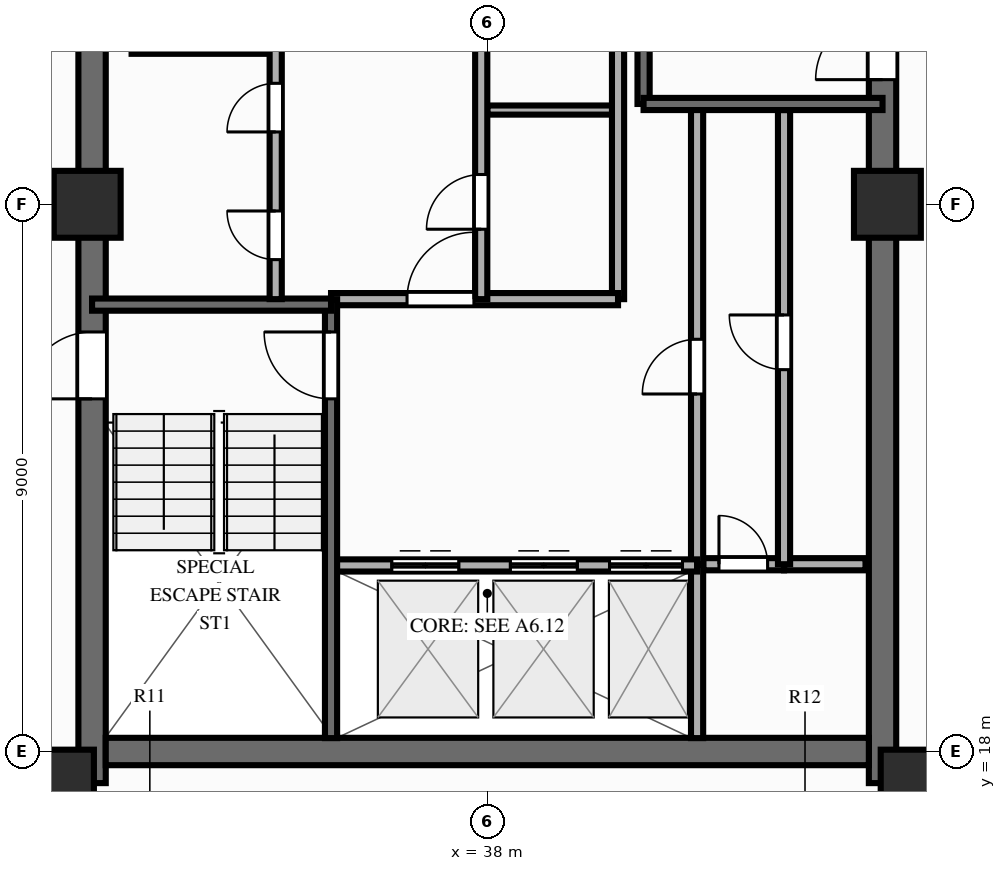
"""IFC4 building model, lengths in metres.
Left out: names, types, materials, properties, quantities, classifications, styles, units other than length and angle.
Written with IfcOpenShell. Run it as: python <this file> out.ifc"""

import sys

from ifc_helpers import new_model, si_unit, direction, frame, frame_2d, origin, origin_2d, place, context, subcontext, project, spatial, rectangle, extrude, source, transform, mapped, element, fill, save


model = new_model("IFC4")
c1 = context("Model", 3, precision=1e-05, world=origin(), true_north=direction((0.0, 1.0)))
c2 = subcontext(c1, "Body", "Model", "MODEL_VIEW")
j1 = project(units=[si_unit("LENGTHUNIT", "METRE"), si_unit("PLANEANGLEUNIT", "RADIAN")], contexts=[c1])
p1 = place(None, origin())
s1 = spatial("IfcSite", under=j1, at=p1, CompositionType="ELEMENT")
p2 = place(p1, origin())
s2 = spatial("IfcBuilding", under=s1, at=p2, CompositionType="ELEMENT")
p3 = place(p2, frame((0.0, 0.0, 176.8)))
s3 = spatial("IfcBuildingStorey", under=s2, at=p3, CompositionType="ELEMENT", Elevation=176.8)
p4 = place(p3, frame((31.5, 17.48, 0.0), z_axis=(0.0, 0.0, 1.0), x_axis=(0.0, 1.0, 0.0)))
e1 = element("IfcWall", 1, at=p4, inside=s3, PredefinedType="SHEAR", context=c2, shape_type="SweptSolid", body=[
    extrude(rectangle(XDim=19.04, YDim=0.45, at=frame_2d((9.52, 0.0))), origin(), (0.0, 0.0, 1.0), 3.0),
])
p5 = place(p4, frame((6.32, 0.0, 0.0)))
e2 = element("IfcOpeningElement", 2, at=p5, cuts=e1, PredefinedType="OPENING", context=c2, shape_type="SweptSolid", body=[
    extrude(rectangle(XDim=1.1, YDim=2.15, at=frame_2d((0.55, 1.075))), frame((0.0, 0.237, 0.0), z_axis=(0.0, -1.0, 0.0), x_axis=(1.0, 0.0, 0.0)), (0.0, 0.0, 1.0), 0.474),
])
p6 = place(p3, frame((44.5, 17.48, 0.0), z_axis=(0.0, 0.0, 1.0), x_axis=(0.0, 1.0, 0.0)))
e3 = element("IfcWall", 3, at=p6, inside=s3, PredefinedType="SHEAR", context=c2, shape_type="SweptSolid", body=[
    extrude(rectangle(XDim=19.04, YDim=0.45, at=frame_2d((9.52, 0.0))), origin(), (0.0, 0.0, 1.0), 3.0),
])
p7 = place(p6, frame((12.67, 0.0, 0.0), z_axis=(0.0, 0.0, 1.0), x_axis=(-1.0, 0.0, 0.0)))
e4 = element("IfcOpeningElement", 4, at=p7, cuts=e3, PredefinedType="OPENING", context=c2, shape_type="SweptSolid", body=[
    extrude(rectangle(XDim=1.1, YDim=2.15, at=frame_2d((0.55, 1.075))), frame((0.0, 0.237, 0.0), z_axis=(0.0, -1.0, 0.0), x_axis=(1.0, 0.0, 0.0)), (0.0, 0.0, 1.0), 0.474),
])
p8 = place(p3, frame((31.725, 18.0, 0.0), z_axis=(0.0, 0.0, 1.0), x_axis=(1.0, 0.0, 0.0)))
e5 = element("IfcWall", 5, at=p8, inside=s3, PredefinedType="SHEAR", context=c2, shape_type="SweptSolid", body=[
    extrude(rectangle(XDim=12.55, YDim=0.45, at=frame_2d((6.275, 0.0))), origin(), (0.0, 0.0, 1.0), 3.0),
])
m1 = source(origin(), c2, "Body", "SweptSolid", [
    extrude(rectangle(XDim=1.1, YDim=1.1, at=origin_2d()), origin(), (0.0, 0.0, 1.0), 3.0),
])
for number, where, z_axis, x_axis in (
    (6, (30.98, 17.48, 0.0), (0.0, 0.0, 1.0), (1.0, 0.0, 0.0)),
    (7, (45.02, 17.48, 0.0), (0.0, 0.0, 1.0), (1.0, 0.0, 0.0)),
    (8, (31.42, 27.0, 0.0), (0.0, 0.0, 1.0), (1.0, 0.0, 0.0)),
    (9, (44.58, 27.0, 0.0), (0.0, 0.0, 1.0), (1.0, 0.0, 0.0)),
):
    element("IfcColumn", number, at=place(p3, frame(where, z_axis=z_axis, x_axis=x_axis)), inside=s3, PredefinedType="COLUMN", context=c2, shape_type="MappedRepresentation", body=[
        mapped(m1, transform((0.0, 0.0, 0.0), scale=1.0)),
    ])
p9 = place(p3, frame((32.15, 29.55, 0.0), z_axis=(0.0, 0.0, 1.0), x_axis=(1.0, 0.0, 0.0)))
e10 = element("IfcWall", 10, at=p9, inside=s3, PredefinedType="PARTITIONING", context=c2, shape_type="SweptSolid", body=[
    extrude(rectangle(XDim=2.27, YDim=0.15, at=frame_2d((1.135, 0.0))), origin(), (0.0, 0.0, 1.0), 2.79),
])
p10 = place(p3, frame((38.0, 28.55, 0.0), z_axis=(0.0, 0.0, 1.0), x_axis=(1.0, 0.0, 0.0)))
e11 = element("IfcWall", 11, at=p10, inside=s3, PredefinedType="PARTITIONING", context=c2, shape_type="SweptSolid", body=[
    extrude(rectangle(XDim=2.2, YDim=0.15, at=frame_2d((1.1, 0.0))), origin(), (0.0, 0.0, 1.0), 2.14),
])
p11 = place(p3, frame((41.55, 21.08, 0.0), z_axis=(0.0, 0.0, 1.0), x_axis=(1.0, 0.0, 0.0)))
e12 = element("IfcWall", 12, at=p11, inside=s3, PredefinedType="PARTITIONING", context=c2, shape_type="SweptSolid", body=[
    extrude(rectangle(XDim=1.33, YDim=0.2, at=frame_2d((0.665, 0.0))), origin(), (0.0, 0.0, 1.0), 2.79),
])
p12 = place(p11, frame((0.26, 0.0, 0.0)))
e13 = element("IfcOpeningElement", 13, at=p12, cuts=e12, PredefinedType="OPENING", context=c2, shape_type="SweptSolid", body=[
    extrude(rectangle(XDim=0.8, YDim=2.05, at=frame_2d((0.4, 1.025))), frame((0.0, 0.112, 0.0), z_axis=(0.0, -1.0, 0.0), x_axis=(1.0, 0.0, 0.0)), (0.0, 0.0, 1.0), 0.224),
])
p13 = place(p3, frame((42.88, 21.08, 0.0), z_axis=(0.0, 0.0, 1.0), x_axis=(1.0, 0.0, 0.0)))
e14 = element("IfcWall", 14, at=p13, inside=s3, PredefinedType="PARTITIONING", context=c2, shape_type="SweptSolid", body=[
    extrude(rectangle(XDim=1.34, YDim=0.2, at=frame_2d((0.67, 0.0))), origin(), (0.0, 0.0, 1.0), 2.79),
])
p14 = place(p3, frame((42.88, 21.08, 0.0), z_axis=(0.0, 0.0, 1.0), x_axis=(0.0, 1.0, 0.0)))
e15 = element("IfcWall", 15, at=p14, inside=s3, PredefinedType="PARTITIONING", context=c2, shape_type="SweptSolid", body=[
    extrude(rectangle(XDim=7.47, YDim=0.2, at=frame_2d((3.735, 0.0))), origin(), (0.0, 0.0, 1.0), 2.79),
])
p15 = place(p14, frame((3.2, 0.0, 0.0)))
e16 = element("IfcOpeningElement", 16, at=p15, cuts=e15, PredefinedType="OPENING", context=c2, shape_type="SweptSolid", body=[
    extrude(rectangle(XDim=0.9, YDim=2.1, at=frame_2d((0.45, 1.05))), frame((0.0, 0.112, 0.0), z_axis=(0.0, -1.0, 0.0), x_axis=(1.0, 0.0, 0.0)), (0.0, 0.0, 1.0), 0.224),
])
p16 = place(p3, frame((41.45, 18.22, 0.0), z_axis=(0.0, 0.0, 1.0), x_axis=(0.0, 1.0, 0.0)))
e17 = element("IfcWall", 17, at=p16, inside=s3, PredefinedType="PARTITIONING", context=c2, shape_type="SweptSolid", body=[
    extrude(rectangle(XDim=2.86, YDim=0.2, at=frame_2d((1.43, 0.0))), origin(), (0.0, 0.0, 1.0), 2.79),
])
p17 = place(p3, frame((41.45, 21.08, 0.0), z_axis=(0.0, 0.0, 1.0), x_axis=(0.0, 1.0, 0.0)))
e18 = element("IfcWall", 18, at=p17, inside=s3, PredefinedType="PARTITIONING", context=c2, shape_type="SweptSolid", body=[
    extrude(rectangle(XDim=7.52, YDim=0.2, at=frame_2d((3.76, 0.0))), origin(), (0.0, 0.0, 1.0), 2.79),
])
p18 = place(p17, frame((2.8, 0.0, 0.0)))
e19 = element("IfcOpeningElement", 19, at=p18, cuts=e18, PredefinedType="OPENING", context=c2, shape_type="SweptSolid", body=[
    extrude(rectangle(XDim=0.9, YDim=2.1, at=frame_2d((0.45, 1.05))), frame((0.0, 0.112, 0.0), z_axis=(0.0, -1.0, 0.0), x_axis=(1.0, 0.0, 0.0)), (0.0, 0.0, 1.0), 0.224),
])
p19 = place(p3, frame((40.15, 25.44, 0.0), z_axis=(0.0, 0.0, 1.0), x_axis=(0.0, 1.0, 0.0)))
e20 = element("IfcWall", 20, at=p19, inside=s3, PredefinedType="PARTITIONING", context=c2, shape_type="SweptSolid", body=[
    extrude(rectangle(XDim=6.36, YDim=0.2, at=frame_2d((3.18, 0.0))), origin(), (0.0, 0.0, 1.0), 2.79),
])
p20 = place(p3, frame((35.43, 21.06, 0.0), z_axis=(0.0, 0.0, 1.0), x_axis=(1.0, 0.0, 0.0)))
e21 = element("IfcWall", 21, at=p20, inside=s3, PredefinedType="PARTITIONING", context=c2, shape_type="SweptSolid", body=[
    extrude(rectangle(XDim=6.02, YDim=0.2, at=frame_2d((3.01, 0.0))), origin(), (0.0, 0.0, 1.0), 2.79),
])
p21 = place(p20, frame((1.0, 0.0, 0.0)))
e22 = element("IfcOpeningElement", 22, at=p21, cuts=e21, PredefinedType="OPENING", context=c2, shape_type="SweptSolid", body=[
    extrude(rectangle(XDim=1.1, YDim=2.15, at=frame_2d((0.55, 1.075))), frame((0.0, 0.112, 0.0), z_axis=(0.0, -1.0, 0.0), x_axis=(1.0, 0.0, 0.0)), (0.0, 0.0, 1.0), 0.224),
])
p22 = place(p20, frame((2.95, 0.0, 0.0)))
e23 = element("IfcOpeningElement", 23, at=p22, cuts=e21, PredefinedType="OPENING", context=c2, shape_type="SweptSolid", body=[
    extrude(rectangle(XDim=1.1, YDim=2.15, at=frame_2d((0.55, 1.075))), frame((0.0, 0.112, 0.0), z_axis=(0.0, -1.0, 0.0), x_axis=(1.0, 0.0, 0.0)), (0.0, 0.0, 1.0), 0.224),
])
p23 = place(p20, frame((4.58, 0.0, 0.0)))
e24 = element("IfcOpeningElement", 24, at=p23, cuts=e21, PredefinedType="OPENING", context=c2, shape_type="SweptSolid", body=[
    extrude(rectangle(XDim=1.2, YDim=2.15, at=frame_2d((0.6, 1.075))), frame((0.0, 0.112, 0.0), z_axis=(0.0, -1.0, 0.0), x_axis=(1.0, 0.0, 0.0)), (0.0, 0.0, 1.0), 0.224),
])
p24 = place(p3, frame((35.43, 25.44, 0.0), z_axis=(0.0, 0.0, 1.0), x_axis=(1.0, 0.0, 0.0)))
e25 = element("IfcWall", 25, at=p24, inside=s3, PredefinedType="PARTITIONING", context=c2, shape_type="SweptSolid", body=[
    extrude(rectangle(XDim=4.72, YDim=0.2, at=frame_2d((2.36, 0.0))), origin(), (0.0, 0.0, 1.0), 2.79),
])
p25 = place(p24, frame((1.25, 0.0, 0.0)))
e26 = element("IfcOpeningElement", 26, at=p25, cuts=e25, PredefinedType="OPENING", context=c2, shape_type="SweptSolid", body=[
    extrude(rectangle(XDim=1.1, YDim=2.15, at=frame_2d((0.55, 1.075))), frame((0.0, 0.112, 0.0), z_axis=(0.0, -1.0, 0.0), x_axis=(1.0, 0.0, 0.0)), (0.0, 0.0, 1.0), 0.224),
])
p26 = place(p3, frame((35.43, 18.22, 0.0), z_axis=(0.0, 0.0, 1.0), x_axis=(0.0, 1.0, 0.0)))
e27 = element("IfcWall", 27, at=p26, inside=s3, PredefinedType="SOLIDWALL", context=c2, shape_type="SweptSolid", body=[
    extrude(rectangle(XDim=7.22, YDim=0.2, at=frame_2d((3.61, 0.0))), origin(), (0.0, 0.0, 1.0), 2.79),
])
p27 = place(p26, frame((6.68, 0.0, 0.0), z_axis=(0.0, 0.0, 1.0), x_axis=(-1.0, 0.0, 0.0)))
e28 = element("IfcOpeningElement", 28, at=p27, cuts=e27, PredefinedType="OPENING", context=c2, shape_type="SweptSolid", body=[
    extrude(rectangle(XDim=1.1, YDim=2.15, at=frame_2d((0.55, 1.075))), frame((0.0, 0.112, 0.0), z_axis=(0.0, -1.0, 0.0), x_axis=(1.0, 0.0, 0.0)), (0.0, 0.0, 1.0), 0.224),
])
p28 = place(p3, frame((31.5, 25.35, 0.0), z_axis=(0.0, 0.0, 1.0), x_axis=(1.0, 0.0, 0.0)))
e29 = element("IfcWall", 29, at=p28, inside=s3, PredefinedType="SOLIDWALL", context=c2, shape_type="SweptSolid", body=[
    extrude(rectangle(XDim=3.93, YDim=0.2, at=frame_2d((1.965, 0.0))), origin(), (0.0, 0.0, 1.0), 2.79),
])
p29 = place(p3, frame((40.57, 28.65, 0.0), z_axis=(0.0, 0.0, 1.0), x_axis=(0.0, 1.0, 0.0)))
e30 = element("IfcWall", 30, at=p29, inside=s3, PredefinedType="SOLIDWALL", context=c2, shape_type="SweptSolid", body=[
    extrude(rectangle(XDim=7.05, YDim=0.2, at=frame_2d((3.525, 0.0))), origin(), (0.0, 0.0, 1.0), 2.79),
])
p30 = place(p3, frame((40.57, 28.65, 0.0), z_axis=(0.0, 0.0, 1.0), x_axis=(1.0, 0.0, 0.0)))
e31 = element("IfcWall", 31, at=p30, inside=s3, PredefinedType="SOLIDWALL", context=c2, shape_type="SweptSolid", body=[
    extrude(rectangle(XDim=3.93, YDim=0.2, at=frame_2d((1.965, 0.0))), origin(), (0.0, 0.0, 1.0), 2.79),
])
p31 = place(p3, frame((34.52, 25.44, 0.0), z_axis=(0.0, 0.0, 1.0), x_axis=(0.0, 1.0, 0.0)))
e32 = element("IfcWall", 32, at=p31, inside=s3, PredefinedType="PARTITIONING", context=c2, shape_type="SweptSolid", body=[
    extrude(rectangle(XDim=10.34, YDim=0.2, at=frame_2d((5.17, 0.0))), origin(), (0.0, 0.0, 1.0), 2.79),
])
p32 = place(p31, frame((0.65, 0.0, 0.0)))
e33 = element("IfcOpeningElement", 33, at=p32, cuts=e32, PredefinedType="OPENING", context=c2, shape_type="SweptSolid", body=[
    extrude(rectangle(XDim=0.8, YDim=2.05, at=frame_2d((0.4, 1.025))), frame((0.0, 0.112, 0.0), z_axis=(0.0, -1.0, 0.0), x_axis=(1.0, 0.0, 0.0)), (0.0, 0.0, 1.0), 0.224),
])
p33 = place(p31, frame((2.75, 0.0, 0.0)))
e34 = element("IfcOpeningElement", 34, at=p33, cuts=e32, PredefinedType="OPENING", context=c2, shape_type="SweptSolid", body=[
    extrude(rectangle(XDim=0.8, YDim=2.05, at=frame_2d((0.4, 1.025))), frame((0.0, 0.112, 0.0), z_axis=(0.0, -1.0, 0.0), x_axis=(1.0, 0.0, 0.0)), (0.0, 0.0, 1.0), 0.224),
])
p34 = place(p31, frame((4.95, 0.0, 0.0)))
e35 = element("IfcOpeningElement", 35, at=p34, cuts=e32, PredefinedType="OPENING", context=c2, shape_type="SweptSolid", body=[
    extrude(rectangle(XDim=0.8, YDim=2.05, at=frame_2d((0.4, 1.025))), frame((0.0, 0.112, 0.0), z_axis=(0.0, -1.0, 0.0), x_axis=(1.0, 0.0, 0.0)), (0.0, 0.0, 1.0), 0.224),
])
p35 = place(p31, frame((7.01, 0.0, 0.0)))
e36 = element("IfcOpeningElement", 36, at=p35, cuts=e32, PredefinedType="OPENING", context=c2, shape_type="SweptSolid", body=[
    extrude(rectangle(XDim=1.0, YDim=2.15, at=frame_2d((0.5, 1.075))), frame((0.0, 0.112, 0.0), z_axis=(0.0, -1.0, 0.0), x_axis=(1.0, 0.0, 0.0)), (0.0, 0.0, 1.0), 0.224),
])
p36 = place(p31, frame((8.76, 0.0, 0.0)))
e37 = element("IfcOpeningElement", 37, at=p36, cuts=e32, PredefinedType="OPENING", context=c2, shape_type="SweptSolid", body=[
    extrude(rectangle(XDim=1.0, YDim=2.15, at=frame_2d((0.5, 1.075))), frame((0.0, 0.112, 0.0), z_axis=(0.0, -1.0, 0.0), x_axis=(1.0, 0.0, 0.0)), (0.0, 0.0, 1.0), 0.224),
])
p37 = place(p3, frame((37.9, 25.44, 0.0), z_axis=(0.0, 0.0, 1.0), x_axis=(0.0, 1.0, 0.0)))
e38 = element("IfcWall", 38, at=p37, inside=s3, PredefinedType="PARTITIONING", context=c2, shape_type="SweptSolid", body=[
    extrude(rectangle(XDim=10.34, YDim=0.2, at=frame_2d((5.17, 0.0))), origin(), (0.0, 0.0, 1.0), 2.79),
])
p38 = place(p37, frame((1.15, 0.0, 0.0)))
e39 = element("IfcOpeningElement", 39, at=p38, cuts=e38, PredefinedType="OPENING", context=c2, shape_type="SweptSolid", body=[
    extrude(rectangle(XDim=0.9, YDim=2.1, at=frame_2d((0.45, 1.05))), frame((0.0, 0.112, 0.0), z_axis=(0.0, -1.0, 0.0), x_axis=(1.0, 0.0, 0.0)), (0.0, 0.0, 1.0), 0.224),
])
p39 = place(p37, frame((4.2, 0.0, 0.0)))
e40 = element("IfcOpeningElement", 40, at=p39, cuts=e38, PredefinedType="OPENING", context=c2, shape_type="SweptSolid", body=[
    extrude(rectangle(XDim=0.9, YDim=2.1, at=frame_2d((0.45, 1.05))), frame((0.0, 0.112, 0.0), z_axis=(0.0, -1.0, 0.0), x_axis=(1.0, 0.0, 0.0)), (0.0, 0.0, 1.0), 0.224),
])
p40 = place(p37, frame((6.86, 0.0, 0.0)))
e41 = element("IfcOpeningElement", 41, at=p40, cuts=e38, PredefinedType="OPENING", context=c2, shape_type="SweptSolid", body=[
    extrude(rectangle(XDim=1.0, YDim=2.15, at=frame_2d((0.5, 1.075))), frame((0.0, 0.112, 0.0), z_axis=(0.0, -1.0, 0.0), x_axis=(1.0, 0.0, 0.0)), (0.0, 0.0, 1.0), 0.224),
])
p41 = place(p37, frame((8.71, 0.0, 0.0)))
e42 = element("IfcOpeningElement", 42, at=p41, cuts=e38, PredefinedType="OPENING", context=c2, shape_type="SweptSolid", body=[
    extrude(rectangle(XDim=1.0, YDim=2.15, at=frame_2d((0.5, 1.075))), frame((0.0, 0.112, 0.0), z_axis=(0.0, -1.0, 0.0), x_axis=(1.0, 0.0, 0.0)), (0.0, 0.0, 1.0), 0.224),
])
m2 = source(origin(), c2, "Body", "SweptSolid", [
    extrude(rectangle(XDim=1.1, YDim=2.15, at=frame_2d((0.55, 1.075))), frame((0.0, 0.025, 0.0), z_axis=(0.0, -1.0, 0.0), x_axis=(1.0, 0.0, 0.0)), (0.0, 0.0, 1.0), 0.05),
])
p42 = place(p5, origin())
e43 = element("IfcDoor", 43, at=p42, inside=s3, OperationType="SINGLE_SWING_LEFT", PredefinedType="DOOR", context=c2, shape_type="MappedRepresentation", body=[
    mapped(m2, transform((0.0, 0.0, 0.0), scale=1.0)),
])
fill(e2, e43)
p43 = place(p7, origin())
e44 = element("IfcDoor", 44, at=p43, inside=s3, OperationType="SINGLE_SWING_RIGHT", PredefinedType="DOOR", context=c2, shape_type="MappedRepresentation", body=[
    mapped(m2, transform((0.0, 0.0, 0.0), scale=1.0)),
])
fill(e4, e44)
m3 = source(origin(), c2, "Body", "SweptSolid", [
    extrude(rectangle(XDim=0.8, YDim=2.05, at=frame_2d((0.4, 1.025))), frame((0.0, 0.025, 0.0), z_axis=(0.0, -1.0, 0.0), x_axis=(1.0, 0.0, 0.0)), (0.0, 0.0, 1.0), 0.05),
])
p44 = place(p12, origin())
e45 = element("IfcDoor", 45, at=p44, inside=s3, OperationType="SINGLE_SWING_LEFT", PredefinedType="DOOR", context=c2, shape_type="MappedRepresentation", body=[
    mapped(m3, transform((0.0, 0.0, 0.0), scale=1.0)),
])
fill(e13, e45)
m4 = source(origin(), c2, "Body", "SweptSolid", [
    extrude(rectangle(XDim=0.9, YDim=2.1, at=frame_2d((0.45, 1.05))), frame((0.0, 0.025, 0.0), z_axis=(0.0, -1.0, 0.0), x_axis=(1.0, 0.0, 0.0)), (0.0, 0.0, 1.0), 0.05),
])
p45 = place(p15, origin())
e46 = element("IfcDoor", 46, at=p45, inside=s3, OperationType="SINGLE_SWING_RIGHT", PredefinedType="DOOR", context=c2, shape_type="MappedRepresentation", body=[
    mapped(m4, transform((0.0, 0.0, 0.0), scale=1.0)),
])
fill(e16, e46)
p46 = place(p18, origin())
e47 = element("IfcDoor", 47, at=p46, inside=s3, OperationType="SINGLE_SWING_LEFT", PredefinedType="DOOR", context=c2, shape_type="MappedRepresentation", body=[
    mapped(m4, transform((0.0, 0.0, 0.0), scale=1.0)),
])
fill(e19, e47)
p47 = place(p21, origin())
e48 = element("IfcDoor", 48, at=p47, inside=s3, OperationType="DOUBLE_DOOR_SLIDING", PredefinedType="DOOR", context=c2, shape_type="MappedRepresentation", body=[
    mapped(m2, transform((0.0, 0.0, 0.0), scale=1.0)),
])
fill(e22, e48)
p48 = place(p22, origin())
e49 = element("IfcDoor", 49, at=p48, inside=s3, OperationType="DOUBLE_DOOR_SLIDING", PredefinedType="DOOR", context=c2, shape_type="MappedRepresentation", body=[
    mapped(m2, transform((0.0, 0.0, 0.0), scale=1.0)),
])
fill(e23, e49)
m5 = source(origin(), c2, "Body", "SweptSolid", [
    extrude(rectangle(XDim=1.2, YDim=2.15, at=frame_2d((0.6, 1.075))), frame((0.0, 0.025, 0.0), z_axis=(0.0, -1.0, 0.0), x_axis=(1.0, 0.0, 0.0)), (0.0, 0.0, 1.0), 0.05),
])
p49 = place(p23, origin())
e50 = element("IfcDoor", 50, at=p49, inside=s3, OperationType="DOUBLE_DOOR_SLIDING", PredefinedType="DOOR", context=c2, shape_type="MappedRepresentation", body=[
    mapped(m5, transform((0.0, 0.0, 0.0), scale=1.0)),
])
fill(e24, e50)
p50 = place(p25, origin())
e51 = element("IfcDoor", 51, at=p50, inside=s3, OperationType="SINGLE_SWING_RIGHT", PredefinedType="DOOR", context=c2, shape_type="MappedRepresentation", body=[
    mapped(m2, transform((0.0, 0.0, 0.0), scale=1.0)),
])
fill(e26, e51)
p51 = place(p27, origin())
e52 = element("IfcDoor", 52, at=p51, inside=s3, OperationType="SINGLE_SWING_LEFT", PredefinedType="DOOR", context=c2, shape_type="MappedRepresentation", body=[
    mapped(m2, transform((0.0, 0.0, 0.0), scale=1.0)),
])
fill(e28, e52)
p52 = place(p32, origin())
e53 = element("IfcDoor", 53, at=p52, inside=s3, OperationType="SINGLE_SWING_RIGHT", PredefinedType="DOOR", context=c2, shape_type="MappedRepresentation", body=[
    mapped(m3, transform((0.0, 0.0, 0.0), scale=1.0)),
])
fill(e33, e53)
p53 = place(p33, origin())
e54 = element("IfcDoor", 54, at=p53, inside=s3, OperationType="SINGLE_SWING_LEFT", PredefinedType="DOOR", context=c2, shape_type="MappedRepresentation", body=[
    mapped(m3, transform((0.0, 0.0, 0.0), scale=1.0)),
])
fill(e34, e54)
p54 = place(p38, origin())
e55 = element("IfcDoor", 55, at=p54, inside=s3, OperationType="SINGLE_SWING_LEFT", PredefinedType="DOOR", context=c2, shape_type="MappedRepresentation", body=[
    mapped(m4, transform((0.0, 0.0, 0.0), scale=1.0)),
])
fill(e39, e55)
save(model, sys.argv[1])
